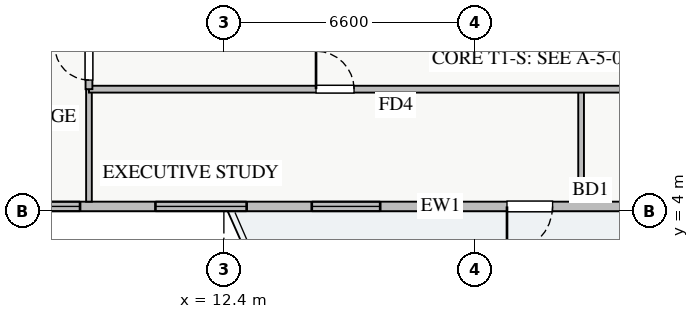
"""IFC4 building model, lengths in metres.
Left out: names, types, materials, properties, quantities, classifications, styles, units other than length and angle.
Written with IfcOpenShell. Run it as: python <this file> out.ifc"""

import sys

from ifc_helpers import new_model, si_unit, direction, frame, frame_2d, origin, place, context, subcontext, project, spatial, rectangle, extrude, source, transform, mapped, element, fill, save


model = new_model("IFC4")
c1 = context("Model", 3, precision=1e-05, world=origin(), true_north=direction((0.0, 1.0)))
c2 = subcontext(c1, "Body", "Model", "MODEL_VIEW")
j1 = project(units=[si_unit("LENGTHUNIT", "METRE"), si_unit("PLANEANGLEUNIT", "RADIAN")], contexts=[c1])
p1 = place(None, origin())
s1 = spatial("IfcSite", under=j1, at=p1, CompositionType="ELEMENT")
p2 = place(p1, origin())
s2 = spatial("IfcBuilding", under=s1, at=p2, CompositionType="ELEMENT")
p3 = place(p2, frame((0.0, 0.0, 82.75)))
s3 = spatial("IfcBuildingStorey", under=s2, at=p3, CompositionType="ELEMENT", Elevation=82.75)
p4 = place(p3, frame((5.45, 4.125, 0.0), z_axis=(0.0, 0.0, 1.0), x_axis=(1.0, 0.0, 0.0)))
e1 = element("IfcWall", 1, at=p4, inside=s3, PredefinedType="STANDARD", context=c2, shape_type="SweptSolid", body=[
    extrude(rectangle(XDim=27.1, YDim=0.25, at=frame_2d((13.55, 0.0))), origin(), (0.0, 0.0, 1.0), 2.61),
])
p5 = place(p4, frame((14.4, 0.0, 0.0)))
e2 = element("IfcOpeningElement", 2, at=p5, cuts=e1, PredefinedType="OPENING", context=c2, shape_type="SweptSolid", body=[
    extrude(rectangle(XDim=1.2, YDim=2.1, at=frame_2d((0.6, 1.05))), frame((0.0, 0.135, 0.0), z_axis=(0.0, -1.0, 0.0), x_axis=(1.0, 0.0, 0.0)), (0.0, 0.0, 1.0), 0.27),
])
p6 = place(p4, frame((1.365, 0.0, 0.9)))
e3 = element("IfcOpeningElement", 3, at=p6, cuts=e1, PredefinedType="OPENING", context=c2, shape_type="SweptSolid", body=[
    extrude(rectangle(XDim=1.8, YDim=1.5, at=frame_2d((0.9, 0.75))), frame((0.0, 0.135, 0.0), z_axis=(0.0, -1.0, 0.0), x_axis=(1.0, 0.0, 0.0)), (0.0, 0.0, 1.0), 0.27),
])
p7 = place(p4, frame((9.263, 0.0, 0.9)))
e4 = element("IfcOpeningElement", 4, at=p7, cuts=e1, PredefinedType="OPENING", context=c2, shape_type="SweptSolid", body=[
    extrude(rectangle(XDim=1.8, YDim=1.45, at=frame_2d((0.9, 0.725))), frame((0.0, 0.135, 0.0), z_axis=(0.0, -1.0, 0.0), x_axis=(1.0, 0.0, 0.0)), (0.0, 0.0, 1.0), 0.27),
])
p8 = place(p4, frame((18.774, 0.0, 0.9)))
e5 = element("IfcOpeningElement", 5, at=p8, cuts=e1, PredefinedType="OPENING", context=c2, shape_type="SweptSolid", body=[
    extrude(rectangle(XDim=1.5, YDim=1.5, at=frame_2d((0.75, 0.75))), frame((0.0, 0.135, 0.0), z_axis=(0.0, -1.0, 0.0), x_axis=(1.0, 0.0, 0.0)), (0.0, 0.0, 1.0), 0.27),
])
p9 = place(p4, frame((22.663, 0.0, 0.9)))
e6 = element("IfcOpeningElement", 6, at=p9, cuts=e1, PredefinedType="OPENING", context=c2, shape_type="SweptSolid", body=[
    extrude(rectangle(XDim=2.1, YDim=1.48, at=frame_2d((1.05, 0.74))), frame((0.0, 0.135, 0.0), z_axis=(0.0, -1.0, 0.0), x_axis=(1.0, 0.0, 0.0)), (0.0, 0.0, 1.0), 0.27),
])
p10 = place(p4, frame((5.149, 0.0, 0.9)))
e7 = element("IfcOpeningElement", 7, at=p10, cuts=e1, PredefinedType="OPENING", context=c2, shape_type="SweptSolid", body=[
    extrude(rectangle(XDim=2.4, YDim=1.5, at=frame_2d((1.2, 0.75))), frame((0.0, 0.135, 0.0), z_axis=(0.0, -1.0, 0.0), x_axis=(1.0, 0.0, 0.0)), (0.0, 0.0, 1.0), 0.27),
])
for number, where, z_axis, x_axis in (
    (8, (21.8, 4.25, 0.0), (0.0, 0.0, 1.0), (0.0, 1.0, 0.0)),
    (9, (8.85, 4.25, 0.0), (0.0, 0.0, 1.0), (0.0, 1.0, 0.0)),
):
    element("IfcWall", number, at=place(p3, frame(where, z_axis=z_axis, x_axis=x_axis)), inside=s3, PredefinedType="PARTITIONING", context=c2, shape_type="SweptSolid", body=[
        extrude(rectangle(XDim=2.96, YDim=0.15, at=frame_2d((1.48, 0.0))), origin(), (0.0, 0.0, 1.0), 3.07),
    ])
p11 = place(p3, frame((8.85, 7.21, 0.0), z_axis=(0.0, 0.0, 1.0), x_axis=(1.0, 0.0, 0.0)))
e10 = element("IfcWall", 10, at=p11, inside=s3, PredefinedType="PARTITIONING", context=c2, shape_type="SweptSolid", body=[
    extrude(rectangle(XDim=23.57, YDim=0.18, at=frame_2d((11.785, 0.0))), origin(), (0.0, 0.0, 1.0), 3.07),
])
p12 = place(p11, frame((5.975, 0.0, 0.0)))
e11 = element("IfcOpeningElement", 11, at=p12, cuts=e10, PredefinedType="OPENING", context=c2, shape_type="SweptSolid", body=[
    extrude(rectangle(XDim=1.0, YDim=2.05, at=frame_2d((0.5, 1.025))), frame((0.0, 0.1, 0.0), z_axis=(0.0, -1.0, 0.0), x_axis=(1.0, 0.0, 0.0)), (0.0, 0.0, 1.0), 0.2),
])
p13 = place(p11, frame((17.76, 0.0, 0.0)))
e12 = element("IfcOpeningElement", 12, at=p13, cuts=e10, PredefinedType="OPENING", context=c2, shape_type="SweptSolid", body=[
    extrude(rectangle(XDim=1.0, YDim=2.05, at=frame_2d((0.5, 1.025))), frame((0.0, 0.1, 0.0), z_axis=(0.0, -1.0, 0.0), x_axis=(1.0, 0.0, 0.0)), (0.0, 0.0, 1.0), 0.2),
])
p14 = place(p3, frame((8.85, 7.21, 0.0), z_axis=(0.0, 0.0, 1.0), x_axis=(0.0, 1.0, 0.0)))
e13 = element("IfcWall", 13, at=p14, inside=s3, PredefinedType="PARTITIONING", context=c2, shape_type="SweptSolid", body=[
    extrude(rectangle(XDim=31.23, YDim=0.18, at=frame_2d((15.615, 0.0))), origin(), (0.0, 0.0, 1.0), 3.07),
])
p15 = place(p14, frame((30.09, 0.0, 0.0)))
e14 = element("IfcOpeningElement", 14, at=p15, cuts=e13, PredefinedType="OPENING", context=c2, shape_type="SweptSolid", body=[
    extrude(rectangle(XDim=0.9, YDim=2.05, at=frame_2d((0.45, 1.025))), frame((0.0, 0.1, 0.0), z_axis=(0.0, -1.0, 0.0), x_axis=(1.0, 0.0, 0.0)), (0.0, 0.0, 1.0), 0.2),
])
p16 = place(p14, frame((0.24, 0.0, 0.0)))
e15 = element("IfcOpeningElement", 15, at=p16, cuts=e13, PredefinedType="OPENING", context=c2, shape_type="SweptSolid", body=[
    extrude(rectangle(XDim=0.9, YDim=2.05, at=frame_2d((0.45, 1.025))), frame((0.0, 0.1, 0.0), z_axis=(0.0, -1.0, 0.0), x_axis=(1.0, 0.0, 0.0)), (0.0, 0.0, 1.0), 0.2),
])
p17 = place(p14, frame((5.895, 0.0, 0.0)))
e16 = element("IfcOpeningElement", 16, at=p17, cuts=e13, PredefinedType="OPENING", context=c2, shape_type="SweptSolid", body=[
    extrude(rectangle(XDim=1.0, YDim=2.05, at=frame_2d((0.5, 1.025))), frame((0.0, 0.1, 0.0), z_axis=(0.0, -1.0, 0.0), x_axis=(1.0, 0.0, 0.0)), (0.0, 0.0, 1.0), 0.2),
])
p18 = place(p14, frame((12.885, 0.0, 0.0)))
e17 = element("IfcOpeningElement", 17, at=p18, cuts=e13, PredefinedType="OPENING", context=c2, shape_type="SweptSolid", body=[
    extrude(rectangle(XDim=1.0, YDim=2.05, at=frame_2d((0.5, 1.025))), frame((0.0, 0.1, 0.0), z_axis=(0.0, -1.0, 0.0), x_axis=(1.0, 0.0, 0.0)), (0.0, 0.0, 1.0), 0.2),
])
p19 = place(p14, frame((21.96, 0.0, 0.0)))
e18 = element("IfcOpeningElement", 18, at=p19, cuts=e13, PredefinedType="OPENING", context=c2, shape_type="SweptSolid", body=[
    extrude(rectangle(XDim=1.0, YDim=2.05, at=frame_2d((0.5, 1.025))), frame((0.0, 0.1, 0.0), z_axis=(0.0, -1.0, 0.0), x_axis=(1.0, 0.0, 0.0)), (0.0, 0.0, 1.0), 0.2),
])
m1 = source(origin(), c2, "Body", "SweptSolid", [
    extrude(rectangle(XDim=1.2, YDim=2.1, at=frame_2d((0.6, 1.05))), frame((0.0, 0.025, 0.0), z_axis=(0.0, -1.0, 0.0), x_axis=(1.0, 0.0, 0.0)), (0.0, 0.0, 1.0), 0.05),
])
p20 = place(p5, frame((1.2, 0.0, 0.0), z_axis=(0.0, 0.0, 1.0), x_axis=(-1.0, 0.0, 0.0)))
e19 = element("IfcDoor", 19, at=p20, inside=s3, OperationType="SINGLE_SWING_LEFT", PredefinedType="DOOR", context=c2, shape_type="MappedRepresentation", body=[
    mapped(m1, transform((0.0, 0.0, 0.0), x_axis=(1.0, 0.0, 0.0), y_axis=(0.0, 1.0, 0.0), z_axis=(0.0, 0.0, 1.0), scale=1.0)),
])
fill(e2, e19)
m2 = source(origin(), c2, "Body", "SweptSolid", [
    extrude(rectangle(XDim=1.8, YDim=1.5, at=frame_2d((0.9, 0.75))), frame((0.0, 0.03, 0.0), z_axis=(0.0, -1.0, 0.0), x_axis=(1.0, 0.0, 0.0)), (0.0, 0.0, 1.0), 0.06),
])
p21 = place(p6, origin())
e20 = element("IfcWindow", 20, at=p21, inside=s3, PartitioningType="TRIPLE_PANEL_VERTICAL", PredefinedType="WINDOW", context=c2, shape_type="MappedRepresentation", body=[
    mapped(m2, transform((0.0, 0.0, 0.0), x_axis=(1.0, 0.0, 0.0), y_axis=(0.0, 1.0, 0.0), z_axis=(0.0, 0.0, 1.0), scale=1.0)),
])
fill(e3, e20)
m3 = source(origin(), c2, "Body", "SweptSolid", [
    extrude(rectangle(XDim=1.8, YDim=1.45, at=frame_2d((0.9, 0.725))), frame((0.0, 0.03, 0.0), z_axis=(0.0, -1.0, 0.0), x_axis=(1.0, 0.0, 0.0)), (0.0, 0.0, 1.0), 0.06),
])
p22 = place(p7, origin())
e21 = element("IfcWindow", 21, at=p22, inside=s3, PartitioningType="DOUBLE_PANEL_VERTICAL", PredefinedType="WINDOW", context=c2, shape_type="MappedRepresentation", body=[
    mapped(m3, transform((0.0, 0.0, 0.0), x_axis=(1.0, 0.0, 0.0), y_axis=(0.0, 1.0, 0.0), z_axis=(0.0, 0.0, 1.0), scale=1.0)),
])
fill(e4, e21)
m4 = source(origin(), c2, "Body", "SweptSolid", [
    extrude(rectangle(XDim=1.0, YDim=2.05, at=frame_2d((0.5, 1.025))), frame((0.0, 0.025, 0.0), z_axis=(0.0, -1.0, 0.0), x_axis=(1.0, 0.0, 0.0)), (0.0, 0.0, 1.0), 0.05),
])
p23 = place(p12, origin())
e22 = element("IfcDoor", 22, at=p23, inside=s3, OperationType="SINGLE_SWING_LEFT", PredefinedType="DOOR", context=c2, shape_type="MappedRepresentation", body=[
    mapped(m4, transform((0.0, 0.0, 0.0), x_axis=(1.0, 0.0, 0.0), y_axis=(0.0, 1.0, 0.0), z_axis=(0.0, 0.0, 1.0), scale=1.0)),
])
fill(e11, e22)
m5 = source(origin(), c2, "Body", "SweptSolid", [
    extrude(rectangle(XDim=0.9, YDim=2.05, at=frame_2d((0.45, 1.025))), frame((0.0, 0.025, 0.0), z_axis=(0.0, -1.0, 0.0), x_axis=(1.0, 0.0, 0.0)), (0.0, 0.0, 1.0), 0.05),
])
p24 = place(p16, origin())
e23 = element("IfcDoor", 23, at=p24, inside=s3, OperationType="SINGLE_SWING_RIGHT", PredefinedType="DOOR", context=c2, shape_type="MappedRepresentation", body=[
    mapped(m5, transform((0.0, 0.0, 0.0), x_axis=(1.0, 0.0, 0.0), y_axis=(0.0, 1.0, 0.0), z_axis=(0.0, 0.0, 1.0), scale=1.0)),
])
fill(e15, e23)
m6 = source(origin(), c2, "Body", "SweptSolid", [
    extrude(rectangle(XDim=2.4, YDim=1.5, at=frame_2d((1.2, 0.75))), frame((0.0, 0.03, 0.0), z_axis=(0.0, -1.0, 0.0), x_axis=(1.0, 0.0, 0.0)), (0.0, 0.0, 1.0), 0.06),
])
p25 = place(p10, origin())
e24 = element("IfcWindow", 24, at=p25, inside=s3, PartitioningType="TRIPLE_PANEL_VERTICAL", PredefinedType="WINDOW", context=c2, shape_type="MappedRepresentation", body=[
    mapped(m6, transform((0.0, 0.0, 0.0), x_axis=(1.0, 0.0, 0.0), y_axis=(0.0, 1.0, 0.0), z_axis=(0.0, 0.0, 1.0), scale=1.0)),
])
fill(e7, e24)
save(model, sys.argv[1])
